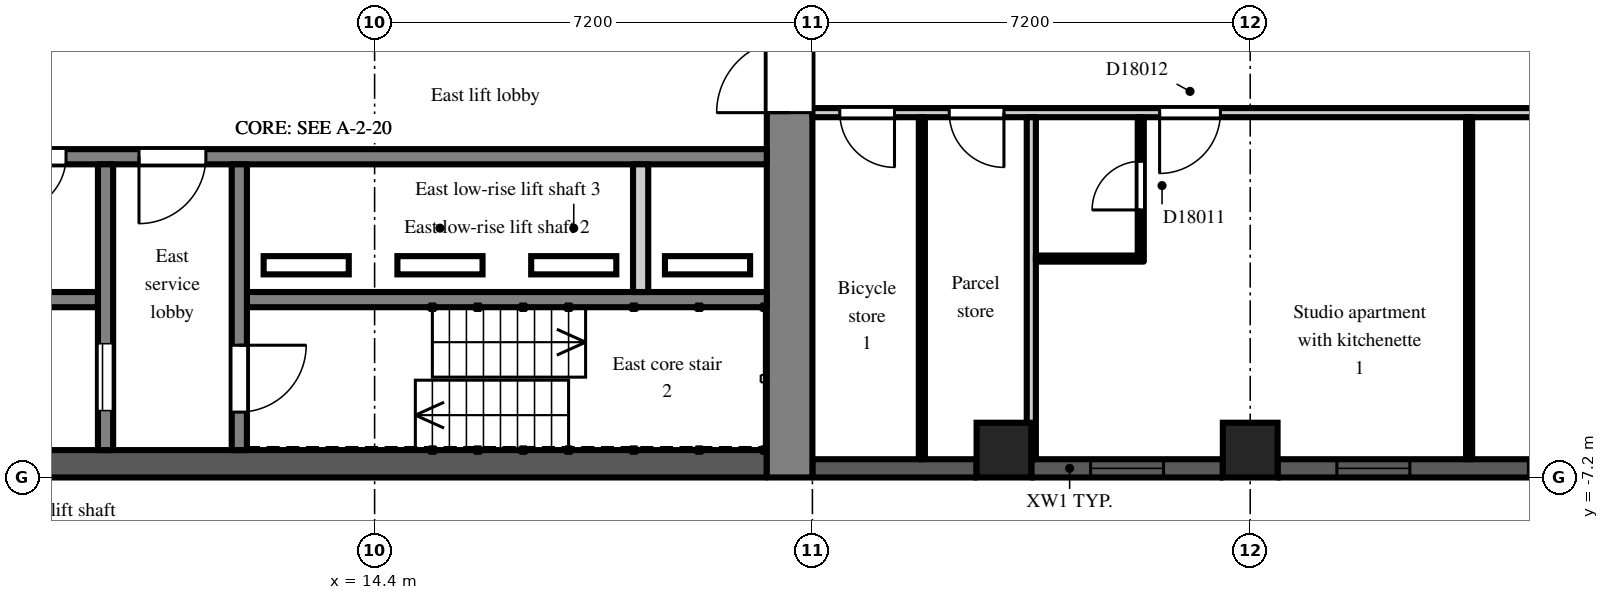
"""IFC4 building model, lengths in metres.
Left out: names, types, materials, properties, quantities, classifications, styles, units other than length and angle.
Written with IfcOpenShell. Run it as: python <this file> out.ifc"""

import sys

from ifc_helpers import new_model, si_unit, direction, frame, frame_2d, origin, origin_2d, place, context, subcontext, project, spatial, rectangle, extrude, element, fill, save


model = new_model("IFC4")
c1 = context("Model", 3, precision=1e-05, world=origin(), true_north=direction((0.0, 1.0)))
c2 = subcontext(c1, "Body", "Model", "MODEL_VIEW")
j1 = project(units=[si_unit("LENGTHUNIT", "METRE"), si_unit("PLANEANGLEUNIT", "RADIAN")], contexts=[c1])
p1 = place(None, origin())
s1 = spatial("IfcSite", under=j1, at=p1, CompositionType="ELEMENT")
p2 = place(p1, origin())
s2 = spatial("IfcBuilding", under=s1, at=p2, CompositionType="ELEMENT")
p3 = place(p2, frame((0.0, 0.0, 120.3)))
s3 = spatial("IfcBuildingStorey", under=s2, at=p3, CompositionType="ELEMENT", Elevation=120.3)
for number, where, z_axis, x_axis in (
    (1, (24.75, -6.75, 0.0), (0.0, 0.0, 1.0), (1.0, 0.0, 0.0)),
    (2, (28.8, -6.75, 0.0), (0.0, 0.0, 1.0), (1.0, 0.0, 0.0)),
):
    element("IfcColumn", number, at=place(p3, frame(where, z_axis=z_axis, x_axis=x_axis)), inside=s3, PredefinedType="COLUMN", context=c2, shape_type="SweptSolid", body=[
        extrude(rectangle(XDim=0.9, YDim=0.9, at=origin_2d()), origin(), (0.0, 0.0, 1.0), 3.0),
    ])
p4 = place(p3, frame((21.6, -7.05, 0.0), z_axis=(0.0, 0.0, 1.0), x_axis=(1.0, 0.0, 0.0)))
e3 = element("IfcWall", 3, at=p4, inside=s3, PredefinedType="SOLIDWALL", context=c2, shape_type="SweptSolid", body=[
    extrude(rectangle(XDim=2.7, YDim=0.3, at=frame_2d((1.35, 0.0))), origin(), (0.0, 0.0, 1.0), 2.2),
])
p5 = place(p3, frame((25.2, -7.05, 0.0), z_axis=(0.0, 0.0, 1.0), x_axis=(1.0, 0.0, 0.0)))
e4 = element("IfcWall", 4, at=p5, inside=s3, PredefinedType="SOLIDWALL", context=c2, shape_type="SweptSolid", body=[
    extrude(rectangle(XDim=3.15, YDim=0.3, at=frame_2d((1.575, 0.0))), origin(), (0.0, 0.0, 1.0), 2.2),
])
p6 = place(p5, frame((0.975, 0.0, 0.2)))
e5 = element("IfcOpeningElement", 5, at=p6, cuts=e4, PredefinedType="OPENING", context=c2, shape_type="SweptSolid", body=[
    extrude(rectangle(XDim=1.2, YDim=1.85, at=frame_2d((0.6, 0.925))), frame((0.0, 0.16, 0.0), z_axis=(0.0, -1.0, 0.0), x_axis=(1.0, 0.0, 0.0)), (0.0, 0.0, 1.0), 0.32),
])
p7 = place(p3, frame((29.25, -7.05, 0.0), z_axis=(0.0, 0.0, 1.0), x_axis=(1.0, 0.0, 0.0)))
e6 = element("IfcWall", 6, at=p7, inside=s3, PredefinedType="SOLIDWALL", context=c2, shape_type="SweptSolid", body=[
    extrude(rectangle(XDim=6.3, YDim=0.3, at=frame_2d((3.15, 0.0))), origin(), (0.0, 0.0, 1.0), 2.2),
])
p8 = place(p7, frame((0.975, 0.0, 0.2)))
e7 = element("IfcOpeningElement", 7, at=p8, cuts=e6, PredefinedType="OPENING", context=c2, shape_type="SweptSolid", body=[
    extrude(rectangle(XDim=1.2, YDim=1.85, at=frame_2d((0.6, 0.925))), frame((0.0, 0.16, 0.0), z_axis=(0.0, -1.0, 0.0), x_axis=(1.0, 0.0, 0.0)), (0.0, 0.0, 1.0), 0.32),
])
p9 = place(p7, frame((4.125, 0.0, 0.2)))
e8 = element("IfcOpeningElement", 8, at=p9, cuts=e6, PredefinedType="OPENING", context=c2, shape_type="SweptSolid", body=[
    extrude(rectangle(XDim=1.2, YDim=1.85, at=frame_2d((0.6, 0.925))), frame((0.0, 0.16, 0.0), z_axis=(0.0, -1.0, 0.0), x_axis=(1.0, 0.0, 0.0)), (0.0, 0.0, 1.0), 0.32),
])
p10 = place(p3, frame((21.225, -7.2, 0.0), z_axis=(0.0, 0.0, 1.0), x_axis=(0.0, 1.0, 0.0)))
e9 = element("IfcWall", 9, at=p10, inside=s3, PredefinedType="SHEAR", context=c2, shape_type="SweptSolid", body=[
    extrude(rectangle(XDim=14.4, YDim=0.75, at=frame_2d((7.2, 0.0))), origin(), (0.0, 0.0, 1.0), 2.6),
])
p11 = place(p10, frame((6.0, 0.0, 0.0)))
e10 = element("IfcOpeningElement", 10, at=p11, cuts=e9, PredefinedType="OPENING", context=c2, shape_type="SweptSolid", body=[
    extrude(rectangle(XDim=2.4, YDim=2.2, at=frame_2d((1.2, 1.1))), frame((0.0, 0.385, 0.0), z_axis=(0.0, -1.0, 0.0), x_axis=(1.0, 0.0, 0.0)), (0.0, 0.0, 1.0), 0.77),
])
p12 = place(p3, frame((7.9, -6.975, 0.0), z_axis=(0.0, 0.0, 1.0), x_axis=(1.0, 0.0, 0.0)))
e11 = element("IfcWall", 11, at=p12, inside=s3, PredefinedType="SHEAR", context=c2, shape_type="SweptSolid", body=[
    extrude(rectangle(XDim=12.95, YDim=0.45, at=frame_2d((6.475, 0.0))), origin(), (0.0, 0.0, 1.0), 2.6),
])
p13 = place(p3, frame((7.9, -1.925, 0.0), z_axis=(0.0, 0.0, 1.0), x_axis=(1.0, 0.0, 0.0)))
e12 = element("IfcWall", 12, at=p13, inside=s3, PredefinedType="SHEAR", context=c2, shape_type="SweptSolid", body=[
    extrude(rectangle(XDim=12.95, YDim=0.25, at=frame_2d((6.475, 0.0))), origin(), (0.0, 0.0, 1.0), 2.6),
])
p14 = place(p13, frame((0.525, 0.0, 0.0)))
e13 = element("IfcOpeningElement", 13, at=p14, cuts=e12, PredefinedType="OPENING", context=c2, shape_type="SweptSolid", body=[
    extrude(rectangle(XDim=0.9, YDim=2.1, at=frame_2d((0.45, 1.05))), frame((0.0, 0.135, 0.0), z_axis=(0.0, -1.0, 0.0), x_axis=(1.0, 0.0, 0.0)), (0.0, 0.0, 1.0), 0.27),
])
p15 = place(p13, frame((2.625, 0.0, 0.0)))
e14 = element("IfcOpeningElement", 14, at=p15, cuts=e12, PredefinedType="OPENING", context=c2, shape_type="SweptSolid", body=[
    extrude(rectangle(XDim=1.1, YDim=2.1, at=frame_2d((0.55, 1.05))), frame((0.0, 0.135, 0.0), z_axis=(0.0, -1.0, 0.0), x_axis=(1.0, 0.0, 0.0)), (0.0, 0.0, 1.0), 0.27),
])
p16 = place(p3, frame((7.9, -4.275, 0.0), z_axis=(0.0, 0.0, 1.0), x_axis=(1.0, 0.0, 0.0)))
e15 = element("IfcWall", 15, at=p16, inside=s3, PredefinedType="SHEAR", context=c2, shape_type="SweptSolid", body=[
    extrude(rectangle(XDim=1.95, YDim=0.25, at=frame_2d((0.975, 0.0))), origin(), (0.0, 0.0, 1.0), 2.6),
])
p17 = place(p3, frame((12.3, -4.275, 0.0), z_axis=(0.0, 0.0, 1.0), x_axis=(1.0, 0.0, 0.0)))
e16 = element("IfcWall", 16, at=p17, inside=s3, PredefinedType="SHEAR", context=c2, shape_type="SweptSolid", body=[
    extrude(rectangle(XDim=8.55, YDim=0.25, at=frame_2d((4.275, 0.0))), origin(), (0.0, 0.0, 1.0), 2.6),
])
p18 = place(p3, frame((9.975, -2.05, 0.0), z_axis=(0.0, 0.0, 1.0), x_axis=(0.0, -1.0, 0.0)))
e17 = element("IfcWall", 17, at=p18, inside=s3, PredefinedType="SHEAR", context=c2, shape_type="SweptSolid", body=[
    extrude(rectangle(XDim=4.7, YDim=0.25, at=frame_2d((2.35, 0.0))), origin(), (0.0, 0.0, 1.0), 2.6),
])
p19 = place(p18, frame((2.95, 0.0, 0.0)))
e18 = element("IfcOpeningElement", 18, at=p19, cuts=e17, PredefinedType="OPENING", context=c2, shape_type="SweptSolid", body=[
    extrude(rectangle(XDim=1.1, YDim=2.1, at=frame_2d((0.55, 1.05))), frame((0.0, 0.135, 0.0), z_axis=(0.0, -1.0, 0.0), x_axis=(1.0, 0.0, 0.0)), (0.0, 0.0, 1.0), 0.27),
])
p20 = place(p3, frame((12.175, -2.05, 0.0), z_axis=(0.0, 0.0, 1.0), x_axis=(0.0, -1.0, 0.0)))
e19 = element("IfcWall", 19, at=p20, inside=s3, PredefinedType="SHEAR", context=c2, shape_type="SweptSolid", body=[
    extrude(rectangle(XDim=4.7, YDim=0.25, at=frame_2d((2.35, 0.0))), origin(), (0.0, 0.0, 1.0), 2.6),
])
p21 = place(p20, frame((2.975, 0.0, 0.0)))
e20 = element("IfcOpeningElement", 20, at=p21, cuts=e19, PredefinedType="OPENING", context=c2, shape_type="SweptSolid", body=[
    extrude(rectangle(XDim=1.1, YDim=2.1, at=frame_2d((0.55, 1.05))), frame((0.0, 0.135, 0.0), z_axis=(0.0, -1.0, 0.0), x_axis=(1.0, 0.0, 0.0)), (0.0, 0.0, 1.0), 0.27),
])
p22 = place(p3, frame((18.775, -2.05, 0.0), z_axis=(0.0, 0.0, 1.0), x_axis=(0.0, -1.0, 0.0)))
e21 = element("IfcWall", 21, at=p22, inside=s3, PredefinedType="PARTITIONING", context=c2, shape_type="SweptSolid", body=[
    extrude(rectangle(XDim=2.1, YDim=0.25, at=frame_2d((1.05, 0.0))), origin(), (0.0, 0.0, 1.0), 2.6),
])
p23 = place(p3, frame((21.6, -1.2, 0.0), z_axis=(0.0, 0.0, 1.0), x_axis=(1.0, 0.0, 0.0)))
e22 = element("IfcWall", 22, at=p23, inside=s3, PredefinedType="PARTITIONING", context=c2, shape_type="SweptSolid", body=[
    extrude(rectangle(XDim=14.9, YDim=0.15, at=frame_2d((7.45, 0.0))), origin(), (0.0, 0.0, 1.0), 2.6),
])
p24 = place(p23, frame((0.45, 0.0, 0.0)))
e23 = element("IfcOpeningElement", 23, at=p24, cuts=e22, PredefinedType="OPENING", context=c2, shape_type="SweptSolid", body=[
    extrude(rectangle(XDim=0.9, YDim=2.1, at=frame_2d((0.45, 1.05))), frame((0.0, 0.085, 0.0), z_axis=(0.0, -1.0, 0.0), x_axis=(1.0, 0.0, 0.0)), (0.0, 0.0, 1.0), 0.17),
])
p25 = place(p23, frame((2.25, 0.0, 0.0)))
e24 = element("IfcOpeningElement", 24, at=p25, cuts=e22, PredefinedType="OPENING", context=c2, shape_type="SweptSolid", body=[
    extrude(rectangle(XDim=0.9, YDim=2.1, at=frame_2d((0.45, 1.05))), frame((0.0, 0.085, 0.0), z_axis=(0.0, -1.0, 0.0), x_axis=(1.0, 0.0, 0.0)), (0.0, 0.0, 1.0), 0.17),
])
p26 = place(p23, frame((5.71, 0.0, 0.0)))
e25 = element("IfcOpeningElement", 25, at=p26, cuts=e22, PredefinedType="OPENING", context=c2, shape_type="SweptSolid", body=[
    extrude(rectangle(XDim=1.0, YDim=2.1, at=frame_2d((0.5, 1.05))), frame((0.0, 0.085, 0.0), z_axis=(0.0, -1.0, 0.0), x_axis=(1.0, 0.0, 0.0)), (0.0, 0.0, 1.0), 0.17),
])
p27 = place(p23, frame((11.95, 0.0, 0.0)))
e26 = element("IfcOpeningElement", 26, at=p27, cuts=e22, PredefinedType="OPENING", context=c2, shape_type="SweptSolid", body=[
    extrude(rectangle(XDim=1.8, YDim=2.1, at=frame_2d((0.9, 1.05))), frame((0.0, 0.085, 0.0), z_axis=(0.0, -1.0, 0.0), x_axis=(1.0, 0.0, 0.0)), (0.0, 0.0, 1.0), 0.17),
])
p28 = place(p3, frame((23.4, -6.9, 0.0), z_axis=(0.0, 0.0, 1.0), x_axis=(0.0, 1.0, 0.0)))
e27 = element("IfcWall", 27, at=p28, inside=s3, PredefinedType="PARTITIONING", context=c2, shape_type="SweptSolid", body=[
    extrude(rectangle(XDim=5.625, YDim=0.1, at=frame_2d((2.812, 0.0))), origin(), (0.0, 0.0, 1.0), 2.6),
])
p29 = place(p3, frame((25.2, -6.9, 0.0), z_axis=(0.0, 0.0, 1.0), x_axis=(0.0, 1.0, 0.0)))
e28 = element("IfcWall", 28, at=p29, inside=s3, PredefinedType="PARTITIONING", context=c2, shape_type="SweptSolid", body=[
    extrude(rectangle(XDim=5.625, YDim=0.15, at=frame_2d((2.812, 0.0))), origin(), (0.0, 0.0, 1.0), 2.6),
])
p30 = place(p3, frame((25.275, -3.6, 0.0), z_axis=(0.0, 0.0, 1.0), x_axis=(1.0, 0.0, 0.0)))
e29 = element("IfcWall", 29, at=p30, inside=s3, PredefinedType="PARTITIONING", context=c2, shape_type="SweptSolid", body=[
    extrude(rectangle(XDim=1.775, YDim=0.1, at=frame_2d((0.888, 0.0))), origin(), (0.0, 0.0, 1.0), 2.6),
])
p31 = place(p3, frame((27.0, -3.55, 0.0), z_axis=(0.0, 0.0, 1.0), x_axis=(0.0, 1.0, 0.0)))
e30 = element("IfcWall", 30, at=p31, inside=s3, PredefinedType="PARTITIONING", context=c2, shape_type="SweptSolid", body=[
    extrude(rectangle(XDim=2.275, YDim=0.1, at=frame_2d((1.138, 0.0))), origin(), (0.0, 0.0, 1.0), 2.6),
])
p32 = place(p31, frame((0.75, 0.0, 0.0)))
e31 = element("IfcOpeningElement", 31, at=p32, cuts=e30, PredefinedType="OPENING", context=c2, shape_type="SweptSolid", body=[
    extrude(rectangle(XDim=0.8, YDim=2.1, at=frame_2d((0.4, 1.05))), frame((0.0, 0.06, 0.0), z_axis=(0.0, -1.0, 0.0), x_axis=(1.0, 0.0, 0.0)), (0.0, 0.0, 1.0), 0.12),
])
p33 = place(p3, frame((32.4, -6.9, 0.0), z_axis=(0.0, 0.0, 1.0), x_axis=(0.0, 1.0, 0.0)))
e32 = element("IfcWall", 32, at=p33, inside=s3, PredefinedType="PARTITIONING", context=c2, shape_type="SweptSolid", body=[
    extrude(rectangle(XDim=5.625, YDim=0.1, at=frame_2d((2.812, 0.0))), origin(), (0.0, 0.0, 1.0), 2.6),
])
p34 = place(p6, origin())
e33 = element("IfcWindow", 33, at=p34, inside=s3, PartitioningType="SINGLE_PANEL", PredefinedType="WINDOW", context=c2, shape_type="SweptSolid", body=[
    extrude(rectangle(XDim=1.2, YDim=1.85, at=frame_2d((0.6, 0.925))), frame((0.0, 0.03, 0.0), z_axis=(0.0, -1.0, 0.0), x_axis=(1.0, 0.0, 0.0)), (0.0, 0.0, 1.0), 0.06),
])
fill(e5, e33)
p35 = place(p8, origin())
e34 = element("IfcWindow", 34, at=p35, inside=s3, PartitioningType="SINGLE_PANEL", PredefinedType="WINDOW", context=c2, shape_type="SweptSolid", body=[
    extrude(rectangle(XDim=1.2, YDim=1.85, at=frame_2d((0.6, 0.925))), frame((0.0, 0.03, 0.0), z_axis=(0.0, -1.0, 0.0), x_axis=(1.0, 0.0, 0.0)), (0.0, 0.0, 1.0), 0.06),
])
fill(e7, e34)
p36 = place(p9, origin())
e35 = element("IfcWindow", 35, at=p36, inside=s3, PartitioningType="SINGLE_PANEL", PredefinedType="WINDOW", context=c2, shape_type="SweptSolid", body=[
    extrude(rectangle(XDim=1.2, YDim=1.85, at=frame_2d((0.6, 0.925))), frame((0.0, 0.03, 0.0), z_axis=(0.0, -1.0, 0.0), x_axis=(1.0, 0.0, 0.0)), (0.0, 0.0, 1.0), 0.06),
])
fill(e8, e35)
p37 = place(p19, origin())
e36 = element("IfcDoor", 36, at=p37, inside=s3, OperationType="SLIDING_TO_LEFT", PredefinedType="DOOR", context=c2, shape_type="SweptSolid", body=[
    extrude(rectangle(XDim=1.1, YDim=2.1, at=frame_2d((0.55, 1.05))), frame((0.0, 0.025, 0.0), z_axis=(0.0, -1.0, 0.0), x_axis=(1.0, 0.0, 0.0)), (0.0, 0.0, 1.0), 0.05),
])
fill(e18, e36)
p38 = place(p21, origin())
e37 = element("IfcDoor", 37, at=p38, inside=s3, OperationType="SINGLE_SWING_LEFT", PredefinedType="DOOR", context=c2, shape_type="SweptSolid", body=[
    extrude(rectangle(XDim=1.1, YDim=2.1, at=frame_2d((0.55, 1.05))), frame((0.0, 0.025, 0.0), z_axis=(0.0, -1.0, 0.0), x_axis=(1.0, 0.0, 0.0)), (0.0, 0.0, 1.0), 0.05),
])
fill(e20, e37)
p39 = place(p14, frame((0.9, 0.0, 0.0), z_axis=(0.0, 0.0, 1.0), x_axis=(-1.0, 0.0, 0.0)))
e38 = element("IfcDoor", 38, at=p39, inside=s3, OperationType="SINGLE_SWING_RIGHT", PredefinedType="DOOR", context=c2, shape_type="SweptSolid", body=[
    extrude(rectangle(XDim=0.9, YDim=2.1, at=frame_2d((0.45, 1.05))), frame((0.0, 0.025, 0.0), z_axis=(0.0, -1.0, 0.0), x_axis=(1.0, 0.0, 0.0)), (0.0, 0.0, 1.0), 0.05),
])
fill(e13, e38)
p40 = place(p15, frame((1.1, 0.0, 0.0), z_axis=(0.0, 0.0, 1.0), x_axis=(-1.0, 0.0, 0.0)))
e39 = element("IfcDoor", 39, at=p40, inside=s3, OperationType="SINGLE_SWING_RIGHT", PredefinedType="DOOR", context=c2, shape_type="SweptSolid", body=[
    extrude(rectangle(XDim=1.1, YDim=2.1, at=frame_2d((0.55, 1.05))), frame((0.0, 0.025, 0.0), z_axis=(0.0, -1.0, 0.0), x_axis=(1.0, 0.0, 0.0)), (0.0, 0.0, 1.0), 0.05),
])
fill(e14, e39)
p41 = place(p11, origin())
e40 = element("IfcDoor", 40, at=p41, inside=s3, OperationType="DOUBLE_DOOR_DOUBLE_SWING", PredefinedType="DOOR", context=c2, shape_type="SweptSolid", body=[
    extrude(rectangle(XDim=2.4, YDim=2.2, at=frame_2d((1.2, 1.1))), frame((0.0, 0.025, 0.0), z_axis=(0.0, -1.0, 0.0), x_axis=(1.0, 0.0, 0.0)), (0.0, 0.0, 1.0), 0.05),
])
fill(e10, e40)
p42 = place(p24, frame((0.9, 0.0, 0.0), z_axis=(0.0, 0.0, 1.0), x_axis=(-1.0, 0.0, 0.0)))
e41 = element("IfcDoor", 41, at=p42, inside=s3, OperationType="SINGLE_SWING_LEFT", PredefinedType="DOOR", context=c2, shape_type="SweptSolid", body=[
    extrude(rectangle(XDim=0.9, YDim=2.1, at=frame_2d((0.45, 1.05))), frame((0.0, 0.025, 0.0), z_axis=(0.0, -1.0, 0.0), x_axis=(1.0, 0.0, 0.0)), (0.0, 0.0, 1.0), 0.05),
])
fill(e23, e41)
p43 = place(p25, frame((0.9, 0.0, 0.0), z_axis=(0.0, 0.0, 1.0), x_axis=(-1.0, 0.0, 0.0)))
e42 = element("IfcDoor", 42, at=p43, inside=s3, OperationType="SINGLE_SWING_LEFT", PredefinedType="DOOR", context=c2, shape_type="SweptSolid", body=[
    extrude(rectangle(XDim=0.9, YDim=2.1, at=frame_2d((0.45, 1.05))), frame((0.0, 0.025, 0.0), z_axis=(0.0, -1.0, 0.0), x_axis=(1.0, 0.0, 0.0)), (0.0, 0.0, 1.0), 0.05),
])
fill(e24, e42)
p44 = place(p32, origin())
e43 = element("IfcDoor", 43, at=p44, inside=s3, OperationType="SINGLE_SWING_LEFT", PredefinedType="DOOR", context=c2, shape_type="SweptSolid", body=[
    extrude(rectangle(XDim=0.8, YDim=2.1, at=frame_2d((0.4, 1.05))), frame((0.0, 0.025, 0.0), z_axis=(0.0, -1.0, 0.0), x_axis=(1.0, 0.0, 0.0)), (0.0, 0.0, 1.0), 0.05),
])
fill(e31, e43)
p45 = place(p26, frame((1.0, 0.0, 0.0), z_axis=(0.0, 0.0, 1.0), x_axis=(-1.0, 0.0, 0.0)))
e44 = element("IfcDoor", 44, at=p45, inside=s3, OperationType="SINGLE_SWING_RIGHT", PredefinedType="DOOR", context=c2, shape_type="SweptSolid", body=[
    extrude(rectangle(XDim=1.0, YDim=2.1, at=frame_2d((0.5, 1.05))), frame((0.0, 0.025, 0.0), z_axis=(0.0, -1.0, 0.0), x_axis=(1.0, 0.0, 0.0)), (0.0, 0.0, 1.0), 0.05),
])
fill(e25, e44)
save(model, sys.argv[1])
